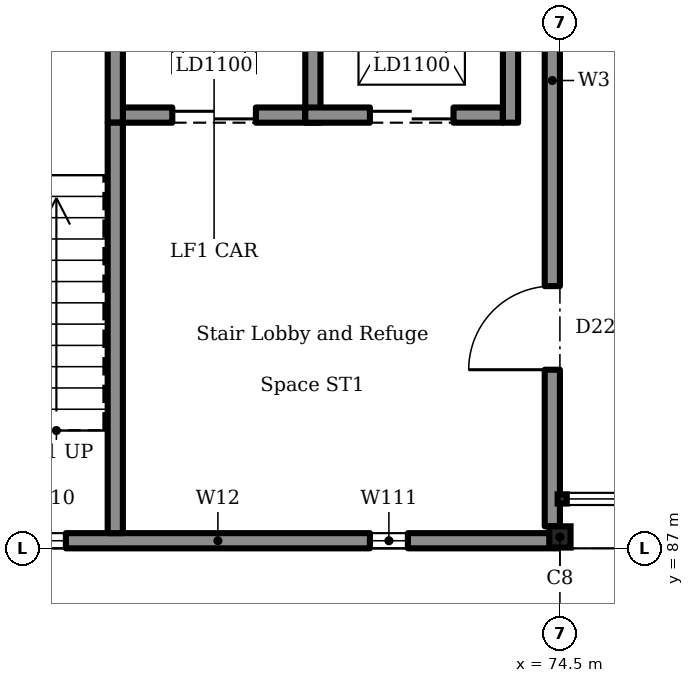
"""IFC4 building model, lengths in metres.
Left out: names, types, materials, properties, quantities, classifications, styles, units other than length and angle.
Written with IfcOpenShell. Run it as: python <this file> out.ifc"""

import sys

from ifc_helpers import new_model, si_unit, direction, frame, frame_2d, origin, origin_2d, place, context, subcontext, project, spatial, rectangle, i_section, extrude, element, fill, save


model = new_model("IFC4")
c1 = context("Model", 3, precision=1e-05, world=origin(), true_north=direction((0.0, 1.0)))
c2 = subcontext(c1, "Body", "Model", "MODEL_VIEW")
j1 = project(units=[si_unit("LENGTHUNIT", "METRE"), si_unit("PLANEANGLEUNIT", "RADIAN")], contexts=[c1])
p1 = place(None, origin())
s1 = spatial("IfcSite", under=j1, at=p1, CompositionType="ELEMENT")
p2 = place(p1, origin())
s2 = spatial("IfcBuilding", under=s1, at=p2, CompositionType="ELEMENT")
p3 = place(p2, frame((0.0, 0.0, 18.9)))
s3 = spatial("IfcBuildingStorey", under=s2, at=p3, CompositionType="ELEMENT", Elevation=18.9)
p4 = place(p3, frame((68.75, 92.7, 0.0), z_axis=(0.0, 0.0, 1.0), x_axis=(1.0, 0.0, 0.0)))
e1 = element("IfcWall", 1, at=p4, inside=s3, PredefinedType="SOLIDWALL", context=c2, shape_type="SweptSolid", body=[
    extrude(rectangle(XDim=2.4, YDim=0.2, at=frame_2d((1.2, 0.0))), origin(), (0.0, 0.0, 1.0), 4.5),
])
p5 = place(p4, frame((0.65, 0.0, 0.0)))
e2 = element("IfcOpeningElement", 2, at=p5, cuts=e1, PredefinedType="OPENING", context=c2, shape_type="SweptSolid", body=[
    extrude(rectangle(XDim=1.1, YDim=2.1, at=frame_2d((0.55, 1.05))), frame((0.0, 0.11, 0.0), z_axis=(0.0, -1.0, 0.0), x_axis=(1.0, 0.0, 0.0)), (0.0, 0.0, 1.0), 0.22),
])
for number, where, z_axis, x_axis in (
    (3, (68.65, 92.6, 0.0), (0.0, 0.0, 1.0), (0.0, 1.0, 0.0)),
    (4, (71.25, 92.6, 0.0), (0.0, 0.0, 1.0), (0.0, 1.0, 0.0)),
):
    element("IfcWall", number, at=place(p3, frame(where, z_axis=z_axis, x_axis=x_axis)), inside=s3, PredefinedType="SOLIDWALL", context=c2, shape_type="SweptSolid", body=[
        extrude(rectangle(XDim=3.4, YDim=0.2, at=frame_2d((1.7, 0.0))), origin(), (0.0, 0.0, 1.0), 4.5),
    ])
p6 = place(p3, frame((71.15, 92.7, 0.0), z_axis=(0.0, 0.0, 1.0), x_axis=(1.0, 0.0, 0.0)))
e5 = element("IfcWall", 5, at=p6, inside=s3, PredefinedType="SOLIDWALL", context=c2, shape_type="SweptSolid", body=[
    extrude(rectangle(XDim=2.6, YDim=0.2, at=frame_2d((1.3, 0.0))), origin(), (0.0, 0.0, 1.0), 4.5),
])
p7 = place(p6, frame((0.85, 0.0, 0.0)))
e6 = element("IfcOpeningElement", 6, at=p7, cuts=e5, PredefinedType="OPENING", context=c2, shape_type="SweptSolid", body=[
    extrude(rectangle(XDim=1.1, YDim=2.1, at=frame_2d((0.55, 1.05))), frame((0.0, 0.11, 0.0), z_axis=(0.0, -1.0, 0.0), x_axis=(1.0, 0.0, 0.0)), (0.0, 0.0, 1.0), 0.22),
])
p8 = place(p3, frame((73.85, 92.6, 0.0), z_axis=(0.0, 0.0, 1.0), x_axis=(0.0, 1.0, 0.0)))
e7 = element("IfcWall", 7, at=p8, inside=s3, PredefinedType="SOLIDWALL", context=c2, shape_type="SweptSolid", body=[
    extrude(rectangle(XDim=3.4, YDim=0.2, at=frame_2d((1.7, 0.0))), origin(), (0.0, 0.0, 1.0), 4.5),
])
p9 = place(p3, frame((74.5, 87.15, 0.0), z_axis=(0.0, 0.0, 1.0), x_axis=(1.0, 0.0, 0.0)))
e8 = element("IfcColumn", 8, at=p9, inside=s3, PredefinedType="COLUMN", context=c2, shape_type="SweptSolid", body=[
    extrude(i_section(OverallWidth=0.28, OverallDepth=0.28, WebThickness=0.01, FlangeThickness=0.018, FilletRadius=0.024, at=origin_2d()), origin(), (0.0, 0.0, 1.0), 4.5),
])
p10 = place(p3, frame((74.4, 87.29, 0.0), z_axis=(0.0, 0.0, 1.0), x_axis=(0.0, 1.0, 0.0)))
e9 = element("IfcWall", 9, at=p10, inside=s3, PredefinedType="SOLIDWALL", context=c2, shape_type="SweptSolid", body=[
    extrude(rectangle(XDim=8.57, YDim=0.2, at=frame_2d((4.285, 0.0))), origin(), (0.0, 0.0, 1.0), 4.35),
])
p11 = place(p10, frame((2.06, 0.0, 0.0)))
e10 = element("IfcOpeningElement", 10, at=p11, cuts=e9, PredefinedType="OPENING", context=c2, shape_type="SweptSolid", body=[
    extrude(rectangle(XDim=1.1, YDim=2.1, at=frame_2d((0.55, 1.05))), frame((0.0, 0.11, 0.0), z_axis=(0.0, -1.0, 0.0), x_axis=(1.0, 0.0, 0.0)), (0.0, 0.0, 1.0), 0.22),
])
p12 = place(p3, frame((65.511, 87.1, 0.0), z_axis=(0.0, 0.0, 1.0), x_axis=(1.0, 0.0, 0.0)))
e11 = element("IfcWall", 11, at=p12, inside=s3, PredefinedType="SOLIDWALL", context=c2, shape_type="SweptSolid", body=[
    extrude(rectangle(XDim=8.978, YDim=0.2, at=frame_2d((4.489, 0.0))), origin(), (0.0, 0.0, 1.0), 4.35),
])
p13 = place(p12, frame((1.989, 0.0, 2.9)))
e12 = element("IfcOpeningElement", 12, at=p13, cuts=e11, PredefinedType="OPENING", context=c2, shape_type="SweptSolid", body=[
    extrude(rectangle(XDim=0.5, YDim=1.2, at=frame_2d((0.25, 0.6))), frame((0.0, 0.11, 0.0), z_axis=(0.0, -1.0, 0.0), x_axis=(1.0, 0.0, 0.0)), (0.0, 0.0, 1.0), 0.22),
])
p14 = place(p12, frame((6.489, 0.0, 2.9)))
e13 = element("IfcOpeningElement", 13, at=p14, cuts=e11, PredefinedType="OPENING", context=c2, shape_type="SweptSolid", body=[
    extrude(rectangle(XDim=0.5, YDim=1.2, at=frame_2d((0.25, 0.6))), frame((0.0, 0.11, 0.0), z_axis=(0.0, -1.0, 0.0), x_axis=(1.0, 0.0, 0.0)), (0.0, 0.0, 1.0), 0.22),
])
p15 = place(p3, frame((68.65, 87.2, 0.0), z_axis=(0.0, 0.0, 1.0), x_axis=(0.0, 1.0, 0.0)))
e14 = element("IfcWall", 14, at=p15, inside=s3, PredefinedType="SOLIDWALL", context=c2, shape_type="SweptSolid", body=[
    extrude(rectangle(XDim=5.4, YDim=0.2, at=frame_2d((2.7, 0.0))), origin(), (0.0, 0.0, 1.0), 4.35),
])
p16 = place(p5, origin())
e15 = element("IfcDoor", 15, at=p16, inside=s3, OperationType="SLIDING_TO_LEFT", PredefinedType="DOOR", context=c2, shape_type="SweptSolid", body=[
    extrude(rectangle(XDim=1.1, YDim=2.1, at=frame_2d((0.55, 1.05))), frame((0.0, 0.025, 0.0), z_axis=(0.0, -1.0, 0.0), x_axis=(1.0, 0.0, 0.0)), (0.0, 0.0, 1.0), 0.05),
])
fill(e2, e15)
p17 = place(p7, origin())
e16 = element("IfcDoor", 16, at=p17, inside=s3, OperationType="SLIDING_TO_LEFT", PredefinedType="DOOR", context=c2, shape_type="SweptSolid", body=[
    extrude(rectangle(XDim=1.1, YDim=2.1, at=frame_2d((0.55, 1.05))), frame((0.0, 0.025, 0.0), z_axis=(0.0, -1.0, 0.0), x_axis=(1.0, 0.0, 0.0)), (0.0, 0.0, 1.0), 0.05),
])
fill(e6, e16)
p18 = place(p13, origin())
e17 = element("IfcWindow", 17, at=p18, inside=s3, PartitioningType="SINGLE_PANEL", PredefinedType="WINDOW", context=c2, shape_type="SweptSolid", body=[
    extrude(rectangle(XDim=0.5, YDim=1.2, at=frame_2d((0.25, 0.6))), frame((0.0, 0.03, 0.0), z_axis=(0.0, -1.0, 0.0), x_axis=(1.0, 0.0, 0.0)), (0.0, 0.0, 1.0), 0.06),
])
fill(e12, e17)
p19 = place(p14, origin())
e18 = element("IfcWindow", 18, at=p19, inside=s3, PartitioningType="SINGLE_PANEL", PredefinedType="WINDOW", context=c2, shape_type="SweptSolid", body=[
    extrude(rectangle(XDim=0.5, YDim=1.2, at=frame_2d((0.25, 0.6))), frame((0.0, 0.03, 0.0), z_axis=(0.0, -1.0, 0.0), x_axis=(1.0, 0.0, 0.0)), (0.0, 0.0, 1.0), 0.06),
])
fill(e13, e18)
p20 = place(p11, origin())
e19 = element("IfcDoor", 19, at=p20, inside=s3, OperationType="SINGLE_SWING_RIGHT", PredefinedType="DOOR", context=c2, shape_type="SweptSolid", body=[
    extrude(rectangle(XDim=1.1, YDim=2.1, at=frame_2d((0.55, 1.05))), frame((0.0, 0.025, 0.0), z_axis=(0.0, -1.0, 0.0), x_axis=(1.0, 0.0, 0.0)), (0.0, 0.0, 1.0), 0.05),
])
fill(e10, e19)
save(model, sys.argv[1])
